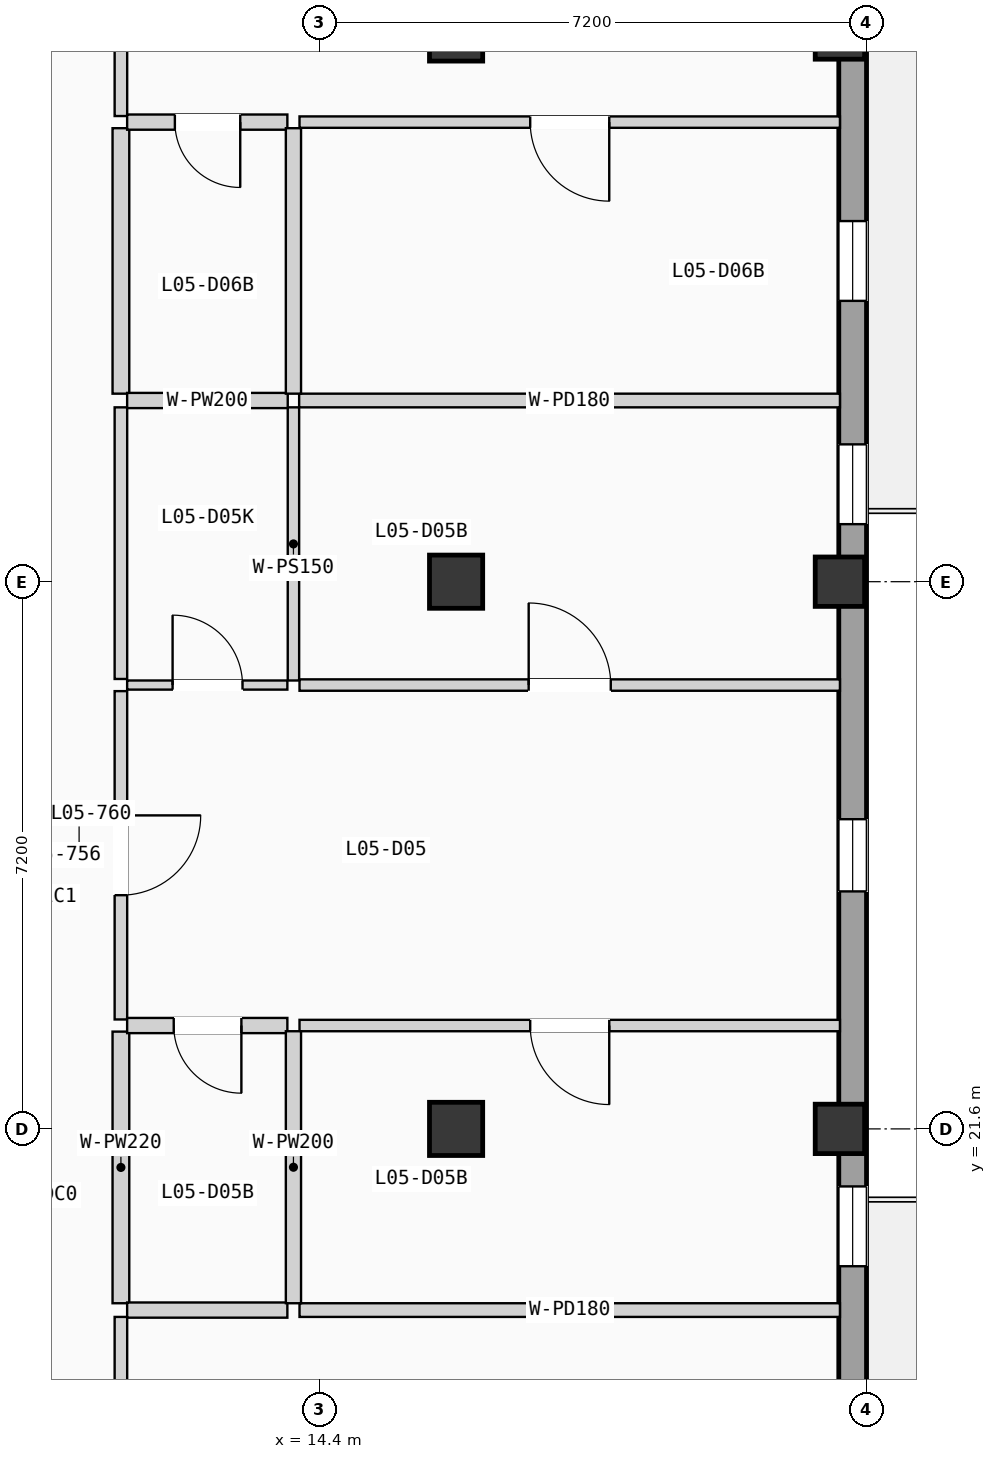
"""IFC4 building model, lengths in metres.
Left out: names, types, materials, properties, quantities, classifications, styles, units other than length and angle.
Written with IfcOpenShell. Run it as: python <this file> out.ifc"""

import sys

from ifc_helpers import new_model, si_unit, direction, frame, frame_2d, origin, origin_2d, place, context, subcontext, project, spatial, rectangle, extrude, element, fill, save


model = new_model("IFC4")
c1 = context("Model", 3, precision=1e-05, world=origin(), true_north=direction((0.0, 1.0)))
c2 = subcontext(c1, "Body", "Model", "MODEL_VIEW")
j1 = project(units=[si_unit("LENGTHUNIT", "METRE"), si_unit("PLANEANGLEUNIT", "RADIAN")], contexts=[c1])
p1 = place(None, origin())
s1 = spatial("IfcSite", under=j1, at=p1, CompositionType="ELEMENT")
p2 = place(p1, origin())
s2 = spatial("IfcBuilding", under=s1, at=p2, CompositionType="ELEMENT")
p3 = place(p2, frame((0.0, 0.0, 18.375)))
s3 = spatial("IfcBuildingStorey", under=s2, at=p3, CompositionType="ELEMENT", Elevation=18.375)
for number, where, z_axis, x_axis in (
    (1, (16.2, 21.6, 0.0), (0.0, 0.0, 1.0), (1.0, 0.0, 0.0)),
    (2, (16.2, 28.8, 0.0), (0.0, 0.0, 1.0), (1.0, 0.0, 0.0)),
    (3, (16.2, 36.0, 0.0), (0.0, 0.0, 1.0), (1.0, 0.0, 0.0)),
):
    element("IfcColumn", number, at=place(p3, frame(where, z_axis=z_axis, x_axis=x_axis)), inside=s3, PredefinedType="COLUMN", context=c2, shape_type="SweptSolid", body=[
        extrude(rectangle(XDim=0.7, YDim=0.7, at=origin_2d()), origin(), (0.0, 0.0, 1.0), 3.15),
    ])
for number, where, z_axis, x_axis in (
    (4, (21.25, 21.6, 0.0), (0.0, 0.0, 1.0), (1.0, 0.0, 0.0)),
    (5, (21.25, 28.8, 0.0), (0.0, 0.0, 1.0), (1.0, 0.0, 0.0)),
    (6, (21.25, 36.0, 0.0), (0.0, 0.0, 1.0), (1.0, 0.0, 0.0)),
):
    element("IfcColumn", number, at=place(p3, frame(where, z_axis=z_axis, x_axis=x_axis)), inside=s3, PredefinedType="COLUMN", context=c2, shape_type="SweptSolid", body=[
        extrude(rectangle(XDim=0.65, YDim=0.65, at=origin_2d()), origin(), (0.0, 0.0, 1.0), 3.15),
    ])
p4 = place(p3, frame((21.417, 0.365, 0.0), z_axis=(0.0, 0.0, 1.0), x_axis=(0.0, 1.0, 0.0)))
e7 = element("IfcWall", 7, at=p4, inside=s3, PredefinedType="SOLIDWALL", context=c2, shape_type="SweptSolid", body=[
    extrude(rectangle(XDim=49.67, YDim=0.365, at=frame_2d((24.835, 0.0))), origin(), (0.0, 0.0, 1.0), 2.89),
])
p5 = place(p4, frame((10.771, 0.0, 0.0)))
e8 = element("IfcOpeningElement", 8, at=p5, cuts=e7, PredefinedType="OPENING", context=c2, shape_type="SweptSolid", body=[
    extrude(rectangle(XDim=0.95, YDim=2.15, at=frame_2d((0.475, 1.075))), frame((0.0, 0.192, 0.0), z_axis=(0.0, -1.0, 0.0), x_axis=(1.0, 0.0, 0.0)), (0.0, 0.0, 1.0), 0.385),
])
p6 = place(p4, frame((16.058, 0.0, 0.555)))
e9 = element("IfcOpeningElement", 9, at=p6, cuts=e7, PredefinedType="OPENING", context=c2, shape_type="SweptSolid", body=[
    extrude(rectangle(XDim=0.95, YDim=1.65, at=frame_2d((0.475, 0.825))), frame((0.0, 0.192, 0.0), z_axis=(0.0, -1.0, 0.0), x_axis=(1.0, 0.0, 0.0)), (0.0, 0.0, 1.0), 0.385),
])
p7 = place(p4, frame((24.36, 0.0, 0.85)))
e10 = element("IfcOpeningElement", 10, at=p7, cuts=e7, PredefinedType="OPENING", context=c2, shape_type="SweptSolid", body=[
    extrude(rectangle(XDim=0.95, YDim=1.2, at=frame_2d((0.475, 0.6))), frame((0.0, 0.192, 0.0), z_axis=(0.0, -1.0, 0.0), x_axis=(1.0, 0.0, 0.0)), (0.0, 0.0, 1.0), 0.385),
])
p8 = place(p4, frame((19.428, 0.0, 0.9)))
e11 = element("IfcOpeningElement", 11, at=p8, cuts=e7, PredefinedType="OPENING", context=c2, shape_type="SweptSolid", body=[
    extrude(rectangle(XDim=1.05, YDim=1.2, at=frame_2d((0.525, 0.6))), frame((0.0, 0.192, 0.0), z_axis=(0.0, -1.0, 0.0), x_axis=(1.0, 0.0, 0.0)), (0.0, 0.0, 1.0), 0.385),
])
p9 = place(p4, frame((29.192, 0.0, 0.855)))
e12 = element("IfcOpeningElement", 12, at=p9, cuts=e7, PredefinedType="OPENING", context=c2, shape_type="SweptSolid", body=[
    extrude(rectangle(XDim=1.05, YDim=1.35, at=frame_2d((0.525, 0.675))), frame((0.0, 0.192, 0.0), z_axis=(0.0, -1.0, 0.0), x_axis=(1.0, 0.0, 0.0)), (0.0, 0.0, 1.0), 0.385),
])
p10 = place(p4, frame((37.218, 0.0, 0.0)))
e13 = element("IfcOpeningElement", 13, at=p10, cuts=e7, PredefinedType="OPENING", context=c2, shape_type="SweptSolid", body=[
    extrude(rectangle(XDim=1.08, YDim=2.18, at=frame_2d((0.54, 1.09))), frame((0.0, 0.192, 0.0), z_axis=(0.0, -1.0, 0.0), x_axis=(1.0, 0.0, 0.0)), (0.0, 0.0, 1.0), 0.385),
])
p11 = place(p4, frame((32.13, 0.0, 0.705)))
e14 = element("IfcOpeningElement", 14, at=p11, cuts=e7, PredefinedType="OPENING", context=c2, shape_type="SweptSolid", body=[
    extrude(rectangle(XDim=1.05, YDim=1.5, at=frame_2d((0.525, 0.75))), frame((0.0, 0.192, 0.0), z_axis=(0.0, -1.0, 0.0), x_axis=(1.0, 0.0, 0.0)), (0.0, 0.0, 1.0), 0.385),
])
p12 = place(p4, frame((40.163, 0.0, 0.555)))
e15 = element("IfcOpeningElement", 15, at=p12, cuts=e7, PredefinedType="OPENING", context=c2, shape_type="SweptSolid", body=[
    extrude(rectangle(XDim=1.05, YDim=1.65, at=frame_2d((0.525, 0.825))), frame((0.0, 0.192, 0.0), z_axis=(0.0, -1.0, 0.0), x_axis=(1.0, 0.0, 0.0)), (0.0, 0.0, 1.0), 0.385),
])
p13 = place(p3, frame((11.79, 13.453, 0.0), z_axis=(0.0, 0.0, 1.0), x_axis=(0.0, 1.0, 0.0)))
e16 = element("IfcWall", 16, at=p13, inside=s3, PredefinedType="PARTITIONING", context=c2, shape_type="SweptSolid", body=[
    extrude(rectangle(XDim=5.673, YDim=0.165, at=frame_2d((2.836, 0.0))), origin(), (0.0, 0.0, 1.0), 2.87),
])
p14 = place(p13, frame((2.347, 0.0, 0.0)))
e17 = element("IfcOpeningElement", 17, at=p14, cuts=e16, PredefinedType="OPENING", context=c2, shape_type="SweptSolid", body=[
    extrude(rectangle(XDim=0.98, YDim=2.08, at=frame_2d((0.49, 1.04))), frame((0.0, 0.093, 0.0), z_axis=(0.0, -1.0, 0.0), x_axis=(1.0, 0.0, 0.0)), (0.0, 0.0, 1.0), 0.185),
])
p15 = place(p3, frame((11.79, 23.04, 0.0), z_axis=(0.0, 0.0, 1.0), x_axis=(0.0, 1.0, 0.0)))
e18 = element("IfcWall", 18, at=p15, inside=s3, PredefinedType="PARTITIONING", context=c2, shape_type="SweptSolid", body=[
    extrude(rectangle(XDim=4.32, YDim=0.165, at=frame_2d((2.16, 0.0))), origin(), (0.0, 0.0, 1.0), 2.87),
])
p16 = place(p15, frame((1.635, 0.0, 0.0)))
e19 = element("IfcOpeningElement", 19, at=p16, cuts=e18, PredefinedType="OPENING", context=c2, shape_type="SweptSolid", body=[
    extrude(rectangle(XDim=1.05, YDim=2.13, at=frame_2d((0.525, 1.065))), frame((0.0, 0.093, 0.0), z_axis=(0.0, -1.0, 0.0), x_axis=(1.0, 0.0, 0.0)), (0.0, 0.0, 1.0), 0.185),
])
p17 = place(p3, frame((11.79, 19.306, 0.0), z_axis=(0.0, 0.0, 1.0), x_axis=(0.0, 1.0, 0.0)))
e20 = element("IfcWall", 20, at=p17, inside=s3, PredefinedType="PLUMBINGWALL", context=c2, shape_type="SweptSolid", body=[
    extrude(rectangle(XDim=3.574, YDim=0.22, at=frame_2d((1.787, 0.0))), origin(), (0.0, 0.0, 1.0), 2.87),
])
p18 = place(p3, frame((11.79, 27.52, 0.0), z_axis=(0.0, 0.0, 1.0), x_axis=(0.0, 1.0, 0.0)))
e21 = element("IfcWall", 21, at=p18, inside=s3, PredefinedType="PARTITIONING", context=c2, shape_type="SweptSolid", body=[
    extrude(rectangle(XDim=3.574, YDim=0.165, at=frame_2d((1.787, 0.0))), origin(), (0.0, 0.0, 1.0), 2.87),
])
p19 = place(p3, frame((11.79, 34.927, 0.0), z_axis=(0.0, 0.0, 1.0), x_axis=(0.0, 1.0, 0.0)))
e22 = element("IfcWall", 22, at=p19, inside=s3, PredefinedType="PARTITIONING", context=c2, shape_type="SweptSolid", body=[
    extrude(rectangle(XDim=4.22, YDim=0.165, at=frame_2d((2.11, 0.0))), origin(), (0.0, 0.0, 1.0), 2.87),
])
p20 = place(p19, frame((1.585, 0.0, 0.0)))
e23 = element("IfcOpeningElement", 23, at=p20, cuts=e22, PredefinedType="OPENING", context=c2, shape_type="SweptSolid", body=[
    extrude(rectangle(XDim=1.05, YDim=2.13, at=frame_2d((0.525, 1.065))), frame((0.0, 0.093, 0.0), z_axis=(0.0, -1.0, 0.0), x_axis=(1.0, 0.0, 0.0)), (0.0, 0.0, 1.0), 0.185),
])
p21 = place(p3, frame((11.79, 31.274, 0.0), z_axis=(0.0, 0.0, 1.0), x_axis=(0.0, 1.0, 0.0)))
e24 = element("IfcWall", 24, at=p21, inside=s3, PredefinedType="PLUMBINGWALL", context=c2, shape_type="SweptSolid", body=[
    extrude(rectangle(XDim=3.493, YDim=0.22, at=frame_2d((1.747, 0.0))), origin(), (0.0, 0.0, 1.0), 2.87),
])
p22 = place(p3, frame((11.872, 19.216, 0.0), z_axis=(0.0, 0.0, 1.0), x_axis=(1.0, 0.0, 0.0)))
e25 = element("IfcWall", 25, at=p22, inside=s3, PredefinedType="PLUMBINGWALL", context=c2, shape_type="SweptSolid", body=[
    extrude(rectangle(XDim=2.108, YDim=0.2, at=frame_2d((1.054, 0.0))), origin(), (0.0, 0.0, 1.0), 2.87),
])
p23 = place(p3, frame((14.14, 19.216, 0.0), z_axis=(0.0, 0.0, 1.0), x_axis=(1.0, 0.0, 0.0)))
e26 = element("IfcWall", 26, at=p23, inside=s3, PredefinedType="PARTITIONING", context=c2, shape_type="SweptSolid", body=[
    extrude(rectangle(XDim=7.11, YDim=0.18, at=frame_2d((3.555, 0.0))), origin(), (0.0, 0.0, 1.0), 2.87),
])
p24 = place(p3, frame((11.872, 22.96, 0.0), z_axis=(0.0, 0.0, 1.0), x_axis=(1.0, 0.0, 0.0)))
e27 = element("IfcWall", 27, at=p24, inside=s3, PredefinedType="PLUMBINGWALL", context=c2, shape_type="SweptSolid", body=[
    extrude(rectangle(XDim=2.108, YDim=0.2, at=frame_2d((1.054, 0.0))), origin(), (0.0, 0.0, 1.0), 2.87),
])
p25 = place(p24, frame((0.613, 0.0, 0.0)))
e28 = element("IfcOpeningElement", 28, at=p25, cuts=e27, PredefinedType="OPENING", context=c2, shape_type="SweptSolid", body=[
    extrude(rectangle(XDim=0.89, YDim=2.03, at=frame_2d((0.445, 1.015))), frame((0.0, 0.11, 0.0), z_axis=(0.0, -1.0, 0.0), x_axis=(1.0, 0.0, 0.0)), (0.0, 0.0, 1.0), 0.22),
])
p26 = place(p3, frame((11.872, 27.44, 0.0), z_axis=(0.0, 0.0, 1.0), x_axis=(1.0, 0.0, 0.0)))
e29 = element("IfcWall", 29, at=p26, inside=s3, PredefinedType="PARTITIONING", context=c2, shape_type="SweptSolid", body=[
    extrude(rectangle(XDim=2.108, YDim=0.12, at=frame_2d((1.054, 0.0))), origin(), (0.0, 0.0, 1.0), 2.87),
])
p27 = place(p26, frame((0.598, 0.0, 0.0)))
e30 = element("IfcOpeningElement", 30, at=p27, cuts=e29, PredefinedType="OPENING", context=c2, shape_type="SweptSolid", body=[
    extrude(rectangle(XDim=0.92, YDim=2.02, at=frame_2d((0.46, 1.01))), frame((0.0, 0.07, 0.0), z_axis=(0.0, -1.0, 0.0), x_axis=(1.0, 0.0, 0.0)), (0.0, 0.0, 1.0), 0.14),
])
p28 = place(p3, frame((14.14, 22.96, 0.0), z_axis=(0.0, 0.0, 1.0), x_axis=(1.0, 0.0, 0.0)))
e31 = element("IfcWall", 31, at=p28, inside=s3, PredefinedType="PARTITIONING", context=c2, shape_type="SweptSolid", body=[
    extrude(rectangle(XDim=7.11, YDim=0.15, at=frame_2d((3.555, 0.0))), origin(), (0.0, 0.0, 1.0), 2.87),
])
p29 = place(p28, frame((3.035, 0.0, 0.0)))
e32 = element("IfcOpeningElement", 32, at=p29, cuts=e31, PredefinedType="OPENING", context=c2, shape_type="SweptSolid", body=[
    extrude(rectangle(XDim=1.04, YDim=2.08, at=frame_2d((0.52, 1.04))), frame((0.0, 0.085, 0.0), z_axis=(0.0, -1.0, 0.0), x_axis=(1.0, 0.0, 0.0)), (0.0, 0.0, 1.0), 0.17),
])
p30 = place(p3, frame((14.14, 27.44, 0.0), z_axis=(0.0, 0.0, 1.0), x_axis=(1.0, 0.0, 0.0)))
e33 = element("IfcWall", 33, at=p30, inside=s3, PredefinedType="PARTITIONING", context=c2, shape_type="SweptSolid", body=[
    extrude(rectangle(XDim=7.11, YDim=0.15, at=frame_2d((3.555, 0.0))), origin(), (0.0, 0.0, 1.0), 2.87),
])
p31 = place(p30, frame((3.015, 0.0, 0.0)))
e34 = element("IfcOpeningElement", 34, at=p31, cuts=e33, PredefinedType="OPENING", context=c2, shape_type="SweptSolid", body=[
    extrude(rectangle(XDim=1.08, YDim=2.1, at=frame_2d((0.54, 1.05))), frame((0.0, 0.085, 0.0), z_axis=(0.0, -1.0, 0.0), x_axis=(1.0, 0.0, 0.0)), (0.0, 0.0, 1.0), 0.17),
])
p32 = place(p3, frame((14.06, 19.306, 0.0), z_axis=(0.0, 0.0, 1.0), x_axis=(0.0, 1.0, 0.0)))
e35 = element("IfcWall", 35, at=p32, inside=s3, PredefinedType="PLUMBINGWALL", context=c2, shape_type="SweptSolid", body=[
    extrude(rectangle(XDim=3.579, YDim=0.2, at=frame_2d((1.79, 0.0))), origin(), (0.0, 0.0, 1.0), 2.87),
])
p33 = place(p3, frame((14.06, 27.5, 0.0), z_axis=(0.0, 0.0, 1.0), x_axis=(0.0, 1.0, 0.0)))
e36 = element("IfcWall", 36, at=p33, inside=s3, PredefinedType="PARTITIONING", context=c2, shape_type="SweptSolid", body=[
    extrude(rectangle(XDim=3.594, YDim=0.15, at=frame_2d((1.797, 0.0))), origin(), (0.0, 0.0, 1.0), 2.87),
])
p34 = place(p3, frame((11.872, 31.184, 0.0), z_axis=(0.0, 0.0, 1.0), x_axis=(1.0, 0.0, 0.0)))
e37 = element("IfcWall", 37, at=p34, inside=s3, PredefinedType="PLUMBINGWALL", context=c2, shape_type="SweptSolid", body=[
    extrude(rectangle(XDim=2.113, YDim=0.2, at=frame_2d((1.057, 0.0))), origin(), (0.0, 0.0, 1.0), 2.87),
])
p35 = place(p3, frame((14.135, 31.184, 0.0), z_axis=(0.0, 0.0, 1.0), x_axis=(1.0, 0.0, 0.0)))
e38 = element("IfcWall", 38, at=p35, inside=s3, PredefinedType="PARTITIONING", context=c2, shape_type="SweptSolid", body=[
    extrude(rectangle(XDim=7.115, YDim=0.18, at=frame_2d((3.558, 0.0))), origin(), (0.0, 0.0, 1.0), 2.87),
])
p36 = place(p3, frame((11.872, 34.847, 0.0), z_axis=(0.0, 0.0, 1.0), x_axis=(1.0, 0.0, 0.0)))
e39 = element("IfcWall", 39, at=p36, inside=s3, PredefinedType="PLUMBINGWALL", context=c2, shape_type="SweptSolid", body=[
    extrude(rectangle(XDim=2.108, YDim=0.2, at=frame_2d((1.054, 0.0))), origin(), (0.0, 0.0, 1.0), 2.87),
])
p37 = place(p36, frame((0.628, 0.0, 0.0)))
e40 = element("IfcOpeningElement", 40, at=p37, cuts=e39, PredefinedType="OPENING", context=c2, shape_type="SweptSolid", body=[
    extrude(rectangle(XDim=0.86, YDim=2.0, at=frame_2d((0.43, 1.0))), frame((0.0, 0.11, 0.0), z_axis=(0.0, -1.0, 0.0), x_axis=(1.0, 0.0, 0.0)), (0.0, 0.0, 1.0), 0.22),
])
p38 = place(p3, frame((14.14, 34.847, 0.0), z_axis=(0.0, 0.0, 1.0), x_axis=(1.0, 0.0, 0.0)))
e41 = element("IfcWall", 41, at=p38, inside=s3, PredefinedType="PARTITIONING", context=c2, shape_type="SweptSolid", body=[
    extrude(rectangle(XDim=7.11, YDim=0.15, at=frame_2d((3.555, 0.0))), origin(), (0.0, 0.0, 1.0), 2.87),
])
p39 = place(p38, frame((3.035, 0.0, 0.0)))
e42 = element("IfcOpeningElement", 42, at=p39, cuts=e41, PredefinedType="OPENING", context=c2, shape_type="SweptSolid", body=[
    extrude(rectangle(XDim=1.04, YDim=2.08, at=frame_2d((0.52, 1.04))), frame((0.0, 0.085, 0.0), z_axis=(0.0, -1.0, 0.0), x_axis=(1.0, 0.0, 0.0)), (0.0, 0.0, 1.0), 0.17),
])
p40 = place(p3, frame((14.06, 31.274, 0.0), z_axis=(0.0, 0.0, 1.0), x_axis=(0.0, 1.0, 0.0)))
e43 = element("IfcWall", 43, at=p40, inside=s3, PredefinedType="PLUMBINGWALL", context=c2, shape_type="SweptSolid", body=[
    extrude(rectangle(XDim=3.493, YDim=0.2, at=frame_2d((1.747, 0.0))), origin(), (0.0, 0.0, 1.0), 2.87),
])
p41 = place(p7, origin())
e44 = element("IfcWindow", 44, at=p41, inside=s3, PartitioningType="SINGLE_PANEL", PredefinedType="WINDOW", context=c2, shape_type="SweptSolid", body=[
    extrude(rectangle(XDim=0.95, YDim=1.2, at=frame_2d((0.475, 0.6))), frame((0.0, 0.03, 0.0), z_axis=(0.0, -1.0, 0.0), x_axis=(1.0, 0.0, 0.0)), (0.0, 0.0, 1.0), 0.06),
])
fill(e10, e44)
p42 = place(p8, origin())
e45 = element("IfcWindow", 45, at=p42, inside=s3, PartitioningType="SINGLE_PANEL", PredefinedType="WINDOW", context=c2, shape_type="SweptSolid", body=[
    extrude(rectangle(XDim=1.05, YDim=1.2, at=frame_2d((0.525, 0.6))), frame((0.0, 0.03, 0.0), z_axis=(0.0, -1.0, 0.0), x_axis=(1.0, 0.0, 0.0)), (0.0, 0.0, 1.0), 0.06),
])
fill(e11, e45)
p43 = place(p9, origin())
e46 = element("IfcWindow", 46, at=p43, inside=s3, PartitioningType="SINGLE_PANEL", PredefinedType="WINDOW", context=c2, shape_type="SweptSolid", body=[
    extrude(rectangle(XDim=1.05, YDim=1.35, at=frame_2d((0.525, 0.675))), frame((0.0, 0.03, 0.0), z_axis=(0.0, -1.0, 0.0), x_axis=(1.0, 0.0, 0.0)), (0.0, 0.0, 1.0), 0.06),
])
fill(e12, e46)
p44 = place(p11, origin())
e47 = element("IfcWindow", 47, at=p44, inside=s3, PartitioningType="SINGLE_PANEL", PredefinedType="WINDOW", context=c2, shape_type="SweptSolid", body=[
    extrude(rectangle(XDim=1.05, YDim=1.5, at=frame_2d((0.525, 0.75))), frame((0.0, 0.03, 0.0), z_axis=(0.0, -1.0, 0.0), x_axis=(1.0, 0.0, 0.0)), (0.0, 0.0, 1.0), 0.06),
])
fill(e14, e47)
p45 = place(p16, frame((1.05, 0.0, 0.0), z_axis=(0.0, 0.0, 1.0), x_axis=(-1.0, 0.0, 0.0)))
e48 = element("IfcDoor", 48, at=p45, inside=s3, OperationType="SINGLE_SWING_RIGHT", PredefinedType="DOOR", context=c2, shape_type="SweptSolid", body=[
    extrude(rectangle(XDim=1.05, YDim=2.13, at=frame_2d((0.525, 1.065))), frame((0.0, 0.025, 0.0), z_axis=(0.0, -1.0, 0.0), x_axis=(1.0, 0.0, 0.0)), (0.0, 0.0, 1.0), 0.05),
])
fill(e19, e48)
p46 = place(p25, frame((0.89, 0.0, 0.0), z_axis=(0.0, 0.0, 1.0), x_axis=(-1.0, 0.0, 0.0)))
e49 = element("IfcDoor", 49, at=p46, inside=s3, OperationType="SINGLE_SWING_RIGHT", PredefinedType="DOOR", context=c2, shape_type="SweptSolid", body=[
    extrude(rectangle(XDim=0.89, YDim=2.03, at=frame_2d((0.445, 1.015))), frame((0.0, 0.025, 0.0), z_axis=(0.0, -1.0, 0.0), x_axis=(1.0, 0.0, 0.0)), (0.0, 0.0, 1.0), 0.05),
])
fill(e28, e49)
p47 = place(p27, origin())
e50 = element("IfcDoor", 50, at=p47, inside=s3, OperationType="SINGLE_SWING_LEFT", PredefinedType="DOOR", context=c2, shape_type="SweptSolid", body=[
    extrude(rectangle(XDim=0.92, YDim=2.02, at=frame_2d((0.46, 1.01))), frame((0.0, 0.025, 0.0), z_axis=(0.0, -1.0, 0.0), x_axis=(1.0, 0.0, 0.0)), (0.0, 0.0, 1.0), 0.05),
])
fill(e30, e50)
p48 = place(p29, frame((1.04, 0.0, 0.0), z_axis=(0.0, 0.0, 1.0), x_axis=(-1.0, 0.0, 0.0)))
e51 = element("IfcDoor", 51, at=p48, inside=s3, OperationType="SINGLE_SWING_RIGHT", PredefinedType="DOOR", context=c2, shape_type="SweptSolid", body=[
    extrude(rectangle(XDim=1.04, YDim=2.08, at=frame_2d((0.52, 1.04))), frame((0.0, 0.025, 0.0), z_axis=(0.0, -1.0, 0.0), x_axis=(1.0, 0.0, 0.0)), (0.0, 0.0, 1.0), 0.05),
])
fill(e32, e51)
p49 = place(p31, origin())
e52 = element("IfcDoor", 52, at=p49, inside=s3, OperationType="SINGLE_SWING_LEFT", PredefinedType="DOOR", context=c2, shape_type="SweptSolid", body=[
    extrude(rectangle(XDim=1.08, YDim=2.1, at=frame_2d((0.54, 1.05))), frame((0.0, 0.025, 0.0), z_axis=(0.0, -1.0, 0.0), x_axis=(1.0, 0.0, 0.0)), (0.0, 0.0, 1.0), 0.05),
])
fill(e34, e52)
p50 = place(p37, frame((0.86, 0.0, 0.0), z_axis=(0.0, 0.0, 1.0), x_axis=(-1.0, 0.0, 0.0)))
e53 = element("IfcDoor", 53, at=p50, inside=s3, OperationType="SINGLE_SWING_RIGHT", PredefinedType="DOOR", context=c2, shape_type="SweptSolid", body=[
    extrude(rectangle(XDim=0.86, YDim=2.0, at=frame_2d((0.43, 1.0))), frame((0.0, 0.025, 0.0), z_axis=(0.0, -1.0, 0.0), x_axis=(1.0, 0.0, 0.0)), (0.0, 0.0, 1.0), 0.05),
])
fill(e40, e53)
p51 = place(p39, frame((1.04, 0.0, 0.0), z_axis=(0.0, 0.0, 1.0), x_axis=(-1.0, 0.0, 0.0)))
e54 = element("IfcDoor", 54, at=p51, inside=s3, OperationType="SINGLE_SWING_RIGHT", PredefinedType="DOOR", context=c2, shape_type="SweptSolid", body=[
    extrude(rectangle(XDim=1.04, YDim=2.08, at=frame_2d((0.52, 1.04))), frame((0.0, 0.025, 0.0), z_axis=(0.0, -1.0, 0.0), x_axis=(1.0, 0.0, 0.0)), (0.0, 0.0, 1.0), 0.05),
])
fill(e42, e54)
save(model, sys.argv[1])
